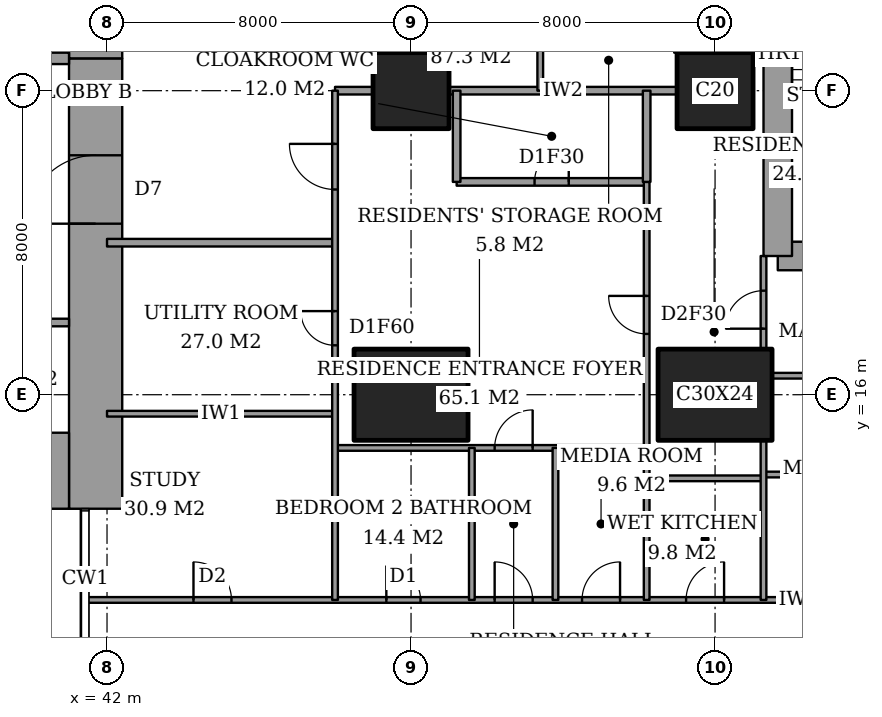
"""IFC4 building model, lengths in metres.
Left out: names, types, materials, properties, quantities, classifications, styles, units other than length and angle.
Written with IfcOpenShell. Run it as: python <this file> out.ifc"""

import sys

from ifc_helpers import new_model, si_unit, direction, frame, frame_2d, origin, origin_2d, place, context, subcontext, project, spatial, rectangle, extrude, element, fill, save


model = new_model("IFC4")
c1 = context("Model", 3, precision=1e-05, world=origin(), true_north=direction((0.0, 1.0)))
c2 = subcontext(c1, "Body", "Model", "MODEL_VIEW")
j1 = project(units=[si_unit("LENGTHUNIT", "METRE"), si_unit("PLANEANGLEUNIT", "RADIAN")], contexts=[c1])
p1 = place(None, origin())
s1 = spatial("IfcSite", under=j1, at=p1, CompositionType="ELEMENT")
p2 = place(p1, origin())
s2 = spatial("IfcBuilding", under=s1, at=p2, CompositionType="ELEMENT")
p3 = place(p2, frame((0.0, 0.0, 103.4)))
s3 = spatial("IfcBuildingStorey", under=s2, at=p3, CompositionType="ELEMENT", Elevation=103.4)
p4 = place(p3, frame((50.0, 16.0, 0.0), z_axis=(0.0, 0.0, 1.0), x_axis=(1.0, 0.0, 0.0)))
e1 = element("IfcColumn", 1, at=p4, inside=s3, PredefinedType="COLUMN", context=c2, shape_type="SweptSolid", body=[
    extrude(rectangle(XDim=3.0, YDim=2.4, at=origin_2d()), origin(), (0.0, 0.0, 1.0), 3.6),
])
p5 = place(p3, frame((50.0, 24.0, 0.0), z_axis=(0.0, 0.0, 1.0), x_axis=(1.0, 0.0, 0.0)))
e2 = element("IfcColumn", 2, at=p5, inside=s3, PredefinedType="COLUMN", context=c2, shape_type="SweptSolid", body=[
    extrude(rectangle(XDim=2.0, YDim=2.0, at=origin_2d()), origin(), (0.0, 0.0, 1.0), 3.6),
])
p6 = place(p3, frame((58.0, 16.0, 0.0), z_axis=(0.0, 0.0, 1.0), x_axis=(1.0, 0.0, 0.0)))
e3 = element("IfcColumn", 3, at=p6, inside=s3, PredefinedType="COLUMN", context=c2, shape_type="SweptSolid", body=[
    extrude(rectangle(XDim=3.0, YDim=2.4, at=origin_2d()), origin(), (0.0, 0.0, 1.0), 3.6),
])
p7 = place(p3, frame((58.0, 24.0, 0.0), z_axis=(0.0, 0.0, 1.0), x_axis=(1.0, 0.0, 0.0)))
e4 = element("IfcColumn", 4, at=p7, inside=s3, PredefinedType="COLUMN", context=c2, shape_type="SweptSolid", body=[
    extrude(rectangle(XDim=2.0, YDim=2.0, at=origin_2d()), origin(), (0.0, 0.0, 1.0), 3.6),
])
p8 = place(p3, frame((37.85, 14.0, 0.0), z_axis=(0.0, 0.0, 1.0), x_axis=(1.0, 0.0, 0.0)))
e5 = element("IfcWall", 5, at=p8, inside=s3, PredefinedType="SHEAR", context=c2, shape_type="SweptSolid", body=[
    extrude(rectangle(XDim=3.15, YDim=2.0, at=frame_2d((1.575, 0.0))), origin(), (0.0, 0.0, 1.0), 3.6),
])
p9 = place(p3, frame((41.7, 13.0, 0.0), z_axis=(0.0, 0.0, 1.0), x_axis=(0.0, 1.0, 0.0)))
e6 = element("IfcWall", 6, at=p9, inside=s3, PredefinedType="SHEAR", context=c2, shape_type="SweptSolid", body=[
    extrude(rectangle(XDim=11.85, YDim=1.4, at=frame_2d((5.925, 0.0))), origin(), (0.0, 0.0, 1.0), 3.6),
])
p10 = place(p9, frame((7.5, 0.0, 0.0)))
e7 = element("IfcOpeningElement", 7, at=p10, cuts=e6, PredefinedType="OPENING", context=c2, shape_type="SweptSolid", body=[
    extrude(rectangle(XDim=1.8, YDim=2.4, at=frame_2d((0.9, 1.2))), frame((0.0, 0.71, 0.0), z_axis=(0.0, -1.0, 0.0), x_axis=(1.0, 0.0, 0.0)), (0.0, 0.0, 1.0), 1.42),
])
p11 = place(p3, frame((41.7, 24.85, 0.0), z_axis=(0.0, 0.0, 1.0), x_axis=(0.0, 1.0, 0.0)))
e8 = element("IfcWall", 8, at=p11, inside=s3, PredefinedType="SHEAR", context=c2, shape_type="SweptSolid", body=[
    extrude(rectangle(XDim=10.15, YDim=1.4, at=frame_2d((5.075, 0.0))), origin(), (0.0, 0.0, 1.0), 3.6),
])
p12 = place(p3, frame((37.85, 24.85, 0.0), z_axis=(0.0, 0.0, 1.0), x_axis=(1.0, 0.0, 0.0)))
e9 = element("IfcWall", 9, at=p12, inside=s3, PredefinedType="SHEAR", context=c2, shape_type="SweptSolid", body=[
    extrude(rectangle(XDim=3.15, YDim=0.3, at=frame_2d((1.575, 0.0))), origin(), (0.0, 0.0, 1.0), 3.6),
])
p13 = place(p12, frame((0.95, 0.0, 0.0)))
e10 = element("IfcOpeningElement", 10, at=p13, cuts=e9, PredefinedType="OPENING", context=c2, shape_type="SweptSolid", body=[
    extrude(rectangle(XDim=1.0, YDim=2.1, at=frame_2d((0.5, 1.05))), frame((0.0, 0.16, 0.0), z_axis=(0.0, -1.0, 0.0), x_axis=(1.0, 0.0, 0.0)), (0.0, 0.0, 1.0), 0.32),
])
p14 = place(p3, frame((59.65, 19.65, 0.0), z_axis=(0.0, 0.0, 1.0), x_axis=(1.0, 0.0, 0.0)))
e11 = element("IfcWall", 11, at=p14, inside=s3, PredefinedType="SHEAR", context=c2, shape_type="SweptSolid", body=[
    extrude(rectangle(XDim=4.45, YDim=0.75, at=frame_2d((2.225, 0.0))), origin(), (0.0, 0.0, 1.0), 3.6),
])
p15 = place(p3, frame((59.65, 28.35, 0.0), z_axis=(0.0, 0.0, 1.0), x_axis=(0.0, -1.0, 0.0)))
e12 = element("IfcWall", 12, at=p15, inside=s3, PredefinedType="SHEAR", context=c2, shape_type="SweptSolid", body=[
    extrude(rectangle(XDim=8.7, YDim=0.75, at=frame_2d((4.35, 0.0))), origin(), (0.0, 0.0, 1.0), 3.6),
])
p16 = place(p15, frame((0.975, 0.0, 0.0)))
e13 = element("IfcOpeningElement", 13, at=p16, cuts=e12, PredefinedType="OPENING", context=c2, shape_type="SweptSolid", body=[
    extrude(rectangle(XDim=1.0, YDim=2.1, at=frame_2d((0.5, 1.05))), frame((0.0, 0.385, 0.0), z_axis=(0.0, -1.0, 0.0), x_axis=(1.0, 0.0, 0.0)), (0.0, 0.0, 1.0), 0.77),
])
p17 = place(p3, frame((41.439, 10.6, 0.0), z_axis=(0.0, 0.0, 1.0), x_axis=(1.0, 0.0, 0.0)))
e14 = element("IfcWall", 14, at=p17, inside=s3, PredefinedType="PARTITIONING", context=c2, shape_type="SweptSolid", body=[
    extrude(rectangle(XDim=25.011, YDim=0.15, at=frame_2d((12.505, 0.0))), origin(), (0.0, 0.0, 1.0), 3.35),
])
p18 = place(p17, frame((10.761, 0.0, 0.0)))
e15 = element("IfcOpeningElement", 15, at=p18, cuts=e14, PredefinedType="OPENING", context=c2, shape_type="SweptSolid", body=[
    extrude(rectangle(XDim=1.0, YDim=2.1, at=frame_2d((0.5, 1.05))), frame((0.0, 0.085, 0.0), z_axis=(0.0, -1.0, 0.0), x_axis=(1.0, 0.0, 0.0)), (0.0, 0.0, 1.0), 0.17),
])
p19 = place(p17, frame((20.924, 0.0, 0.0)))
e16 = element("IfcOpeningElement", 16, at=p19, cuts=e14, PredefinedType="OPENING", context=c2, shape_type="SweptSolid", body=[
    extrude(rectangle(XDim=1.0, YDim=2.1, at=frame_2d((0.5, 1.05))), frame((0.0, 0.085, 0.0), z_axis=(0.0, -1.0, 0.0), x_axis=(1.0, 0.0, 0.0)), (0.0, 0.0, 1.0), 0.17),
])
p20 = place(p17, frame((15.799, 0.0, 0.0)))
e17 = element("IfcOpeningElement", 17, at=p20, cuts=e14, PredefinedType="OPENING", context=c2, shape_type="SweptSolid", body=[
    extrude(rectangle(XDim=1.0, YDim=2.1, at=frame_2d((0.5, 1.05))), frame((0.0, 0.085, 0.0), z_axis=(0.0, -1.0, 0.0), x_axis=(1.0, 0.0, 0.0)), (0.0, 0.0, 1.0), 0.17),
])
p21 = place(p17, frame((13.061, 0.0, 0.0)))
e18 = element("IfcOpeningElement", 18, at=p21, cuts=e14, PredefinedType="OPENING", context=c2, shape_type="SweptSolid", body=[
    extrude(rectangle(XDim=1.0, YDim=2.1, at=frame_2d((0.5, 1.05))), frame((0.0, 0.085, 0.0), z_axis=(0.0, -1.0, 0.0), x_axis=(1.0, 0.0, 0.0)), (0.0, 0.0, 1.0), 0.17),
])
p22 = place(p17, frame((7.911, 0.0, 0.0)))
e19 = element("IfcOpeningElement", 19, at=p22, cuts=e14, PredefinedType="OPENING", context=c2, shape_type="SweptSolid", body=[
    extrude(rectangle(XDim=0.9, YDim=2.1, at=frame_2d((0.45, 1.05))), frame((0.0, 0.085, 0.0), z_axis=(0.0, -1.0, 0.0), x_axis=(1.0, 0.0, 0.0)), (0.0, 0.0, 1.0), 0.17),
])
p23 = place(p17, frame((2.836, 0.0, 0.0)))
e20 = element("IfcOpeningElement", 20, at=p23, cuts=e14, PredefinedType="OPENING", context=c2, shape_type="SweptSolid", body=[
    extrude(rectangle(XDim=1.0, YDim=2.1, at=frame_2d((0.5, 1.05))), frame((0.0, 0.085, 0.0), z_axis=(0.0, -1.0, 0.0), x_axis=(1.0, 0.0, 0.0)), (0.0, 0.0, 1.0), 0.17),
])
p24 = place(p3, frame((56.2, 13.8, 0.0), z_axis=(0.0, 0.0, 1.0), x_axis=(1.0, 0.0, 0.0)))
e21 = element("IfcWall", 21, at=p24, inside=s3, PredefinedType="PARTITIONING", context=c2, shape_type="SweptSolid", body=[
    extrude(rectangle(XDim=3.075, YDim=0.15, at=frame_2d((1.538, 0.0))), origin(), (0.0, 0.0, 1.0), 3.35),
])
p25 = place(p3, frame((59.275, 13.9, 0.0), z_axis=(0.0, 0.0, 1.0), x_axis=(1.0, 0.0, 0.0)))
e22 = element("IfcWall", 22, at=p25, inside=s3, PredefinedType="PARTITIONING", context=c2, shape_type="SweptSolid", body=[
    extrude(rectangle(XDim=2.4, YDim=0.15, at=frame_2d((1.2, 0.0))), origin(), (0.0, 0.0, 1.0), 3.35),
])
p26 = place(p3, frame((48.0, 14.6, 0.0), z_axis=(0.0, 0.0, 1.0), x_axis=(1.0, 0.0, 0.0)))
e23 = element("IfcWall", 23, at=p26, inside=s3, PredefinedType="PARTITIONING", context=c2, shape_type="SweptSolid", body=[
    extrude(rectangle(XDim=8.2, YDim=0.15, at=frame_2d((4.1, 0.0))), origin(), (0.0, 0.0, 1.0), 3.35),
])
p27 = place(p26, frame((4.2, 0.0, 0.0)))
e24 = element("IfcOpeningElement", 24, at=p27, cuts=e23, PredefinedType="OPENING", context=c2, shape_type="SweptSolid", body=[
    extrude(rectangle(XDim=1.0, YDim=2.1, at=frame_2d((0.5, 1.05))), frame((0.0, 0.085, 0.0), z_axis=(0.0, -1.0, 0.0), x_axis=(1.0, 0.0, 0.0)), (0.0, 0.0, 1.0), 0.17),
])
p28 = place(p3, frame((42.0, 15.5, 0.0), z_axis=(0.0, 0.0, 1.0), x_axis=(1.0, 0.0, 0.0)))
e25 = element("IfcWall", 25, at=p28, inside=s3, PredefinedType="PARTITIONING", context=c2, shape_type="SweptSolid", body=[
    extrude(rectangle(XDim=6.0, YDim=0.15, at=frame_2d((3.0, 0.0))), origin(), (0.0, 0.0, 1.0), 3.35),
])
p29 = place(p3, frame((59.5, 16.5, 0.0), z_axis=(0.0, 0.0, 1.0), x_axis=(1.0, 0.0, 0.0)))
e26 = element("IfcWall", 26, at=p29, inside=s3, PredefinedType="PARTITIONING", context=c2, shape_type="SweptSolid", body=[
    extrude(rectangle(XDim=5.15, YDim=0.15, at=frame_2d((2.575, 0.0))), origin(), (0.0, 0.0, 1.0), 3.35),
])
p30 = place(p3, frame((42.0, 20.0, 0.0), z_axis=(0.0, 0.0, 1.0), x_axis=(1.0, 0.0, 0.0)))
e27 = element("IfcWall", 27, at=p30, inside=s3, PredefinedType="PARTITIONING", context=c2, shape_type="SweptSolid", body=[
    extrude(rectangle(XDim=6.0, YDim=0.2, at=frame_2d((3.0, 0.0))), origin(), (0.0, 0.0, 1.0), 3.35),
])
p31 = place(p3, frame((51.2, 21.6, 0.0), z_axis=(0.0, 0.0, 1.0), x_axis=(1.0, 0.0, 0.0)))
e28 = element("IfcWall", 28, at=p31, inside=s3, PredefinedType="PARTITIONING", context=c2, shape_type="SweptSolid", body=[
    extrude(rectangle(XDim=5.0, YDim=0.2, at=frame_2d((2.5, 0.0))), origin(), (0.0, 0.0, 1.0), 3.35),
])
p32 = place(p31, frame((2.05, 0.0, 0.0)))
e29 = element("IfcOpeningElement", 29, at=p32, cuts=e28, PredefinedType="OPENING", context=c2, shape_type="SweptSolid", body=[
    extrude(rectangle(XDim=0.9, YDim=2.1, at=frame_2d((0.45, 1.05))), frame((0.0, 0.11, 0.0), z_axis=(0.0, -1.0, 0.0), x_axis=(1.0, 0.0, 0.0)), (0.0, 0.0, 1.0), 0.22),
])
p33 = place(p3, frame((48.0, 24.0, 0.0), z_axis=(0.0, 0.0, 1.0), x_axis=(1.0, 0.0, 0.0)))
e30 = element("IfcWall", 30, at=p33, inside=s3, PredefinedType="PARTITIONING", context=c2, shape_type="SweptSolid", body=[
    extrude(rectangle(XDim=1.0, YDim=0.2, at=frame_2d((0.5, 0.0))), origin(), (0.0, 0.0, 1.0), 3.35),
])
p34 = place(p3, frame((51.0, 24.0, 0.0), z_axis=(0.0, 0.0, 1.0), x_axis=(1.0, 0.0, 0.0)))
e31 = element("IfcWall", 31, at=p34, inside=s3, PredefinedType="PARTITIONING", context=c2, shape_type="SweptSolid", body=[
    extrude(rectangle(XDim=6.0, YDim=0.2, at=frame_2d((3.0, 0.0))), origin(), (0.0, 0.0, 1.0), 3.35),
])
p35 = place(p3, frame((48.0, 10.6, 0.0), z_axis=(0.0, 0.0, 1.0), x_axis=(0.0, 1.0, 0.0)))
e32 = element("IfcWall", 32, at=p35, inside=s3, PredefinedType="PARTITIONING", context=c2, shape_type="SweptSolid", body=[
    extrude(rectangle(XDim=13.4, YDim=0.15, at=frame_2d((6.7, 0.0))), origin(), (0.0, 0.0, 1.0), 3.35),
])
p36 = place(p35, frame((10.8, 0.0, 0.0)))
e33 = element("IfcOpeningElement", 33, at=p36, cuts=e32, PredefinedType="OPENING", context=c2, shape_type="SweptSolid", body=[
    extrude(rectangle(XDim=1.2, YDim=2.4, at=frame_2d((0.6, 1.2))), frame((0.0, 0.085, 0.0), z_axis=(0.0, -1.0, 0.0), x_axis=(1.0, 0.0, 0.0)), (0.0, 0.0, 1.0), 0.17),
])
p37 = place(p35, frame((6.7, 0.0, 0.0)))
e34 = element("IfcOpeningElement", 34, at=p37, cuts=e32, PredefinedType="OPENING", context=c2, shape_type="SweptSolid", body=[
    extrude(rectangle(XDim=0.9, YDim=2.1, at=frame_2d((0.45, 1.05))), frame((0.0, 0.085, 0.0), z_axis=(0.0, -1.0, 0.0), x_axis=(1.0, 0.0, 0.0)), (0.0, 0.0, 1.0), 0.17),
])
p38 = place(p3, frame((51.2, 21.6, 0.0), z_axis=(0.0, 0.0, 1.0), x_axis=(0.0, 1.0, 0.0)))
e35 = element("IfcWall", 35, at=p38, inside=s3, PredefinedType="PARTITIONING", context=c2, shape_type="SweptSolid", body=[
    extrude(rectangle(XDim=2.4, YDim=0.2, at=frame_2d((1.2, 0.0))), origin(), (0.0, 0.0, 1.0), 3.35),
])
p39 = place(p3, frame((51.6, 10.6, 0.0), z_axis=(0.0, 0.0, 1.0), x_axis=(0.0, 1.0, 0.0)))
e36 = element("IfcWall", 36, at=p39, inside=s3, PredefinedType="PARTITIONING", context=c2, shape_type="SweptSolid", body=[
    extrude(rectangle(XDim=4.0, YDim=0.15, at=frame_2d((2.0, 0.0))), origin(), (0.0, 0.0, 1.0), 3.35),
])
p40 = place(p3, frame((53.4, 24.0, 0.0), z_axis=(0.0, 0.0, 1.0), x_axis=(0.0, 1.0, 0.0)))
e37 = element("IfcWall", 37, at=p40, inside=s3, PredefinedType="PARTITIONING", context=c2, shape_type="SweptSolid", body=[
    extrude(rectangle(XDim=1.6, YDim=0.15, at=frame_2d((0.8, 0.0))), origin(), (0.0, 0.0, 1.0), 3.35),
])
p41 = place(p3, frame((53.8, 10.6, 0.0), z_axis=(0.0, 0.0, 1.0), x_axis=(0.0, 1.0, 0.0)))
e38 = element("IfcWall", 38, at=p41, inside=s3, PredefinedType="PARTITIONING", context=c2, shape_type="SweptSolid", body=[
    extrude(rectangle(XDim=4.0, YDim=0.15, at=frame_2d((2.0, 0.0))), origin(), (0.0, 0.0, 1.0), 3.35),
])
p42 = place(p3, frame((56.2, 21.6, 0.0), z_axis=(0.0, 0.0, 1.0), x_axis=(0.0, 1.0, 0.0)))
e39 = element("IfcWall", 39, at=p42, inside=s3, PredefinedType="PARTITIONING", context=c2, shape_type="SweptSolid", body=[
    extrude(rectangle(XDim=2.4, YDim=0.2, at=frame_2d((1.2, 0.0))), origin(), (0.0, 0.0, 1.0), 3.35),
])
p43 = place(p3, frame((56.2, 10.6, 0.0), z_axis=(0.0, 0.0, 1.0), x_axis=(0.0, 1.0, 0.0)))
e40 = element("IfcWall", 40, at=p43, inside=s3, PredefinedType="PARTITIONING", context=c2, shape_type="SweptSolid", body=[
    extrude(rectangle(XDim=11.0, YDim=0.15, at=frame_2d((5.5, 0.0))), origin(), (0.0, 0.0, 1.0), 3.35),
])
p44 = place(p43, frame((7.0, 0.0, 0.0)))
e41 = element("IfcOpeningElement", 41, at=p44, cuts=e40, PredefinedType="OPENING", context=c2, shape_type="SweptSolid", body=[
    extrude(rectangle(XDim=1.0, YDim=2.1, at=frame_2d((0.5, 1.05))), frame((0.0, 0.085, 0.0), z_axis=(0.0, -1.0, 0.0), x_axis=(1.0, 0.0, 0.0)), (0.0, 0.0, 1.0), 0.17),
])
p45 = place(p3, frame((59.275, 10.6, 0.0), z_axis=(0.0, 0.0, 1.0), x_axis=(0.0, 1.0, 0.0)))
e42 = element("IfcWall", 42, at=p45, inside=s3, PredefinedType="PARTITIONING", context=c2, shape_type="SweptSolid", body=[
    extrude(rectangle(XDim=4.2, YDim=0.15, at=frame_2d((2.1, 0.0))), origin(), (0.0, 0.0, 1.0), 3.35),
])
p46 = place(p3, frame((59.275, 17.2, 0.0), z_axis=(0.0, 0.0, 1.0), x_axis=(0.0, 1.0, 0.0)))
e43 = element("IfcWall", 43, at=p46, inside=s3, PredefinedType="PARTITIONING", context=c2, shape_type="SweptSolid", body=[
    extrude(rectangle(XDim=2.45, YDim=0.15, at=frame_2d((1.225, 0.0))), origin(), (0.0, 0.0, 1.0), 3.35),
])
p47 = place(p46, frame((0.538, 0.0, 0.0)))
e44 = element("IfcOpeningElement", 44, at=p47, cuts=e43, PredefinedType="OPENING", context=c2, shape_type="SweptSolid", body=[
    extrude(rectangle(XDim=1.0, YDim=2.1, at=frame_2d((0.5, 1.05))), frame((0.0, 0.085, 0.0), z_axis=(0.0, -1.0, 0.0), x_axis=(1.0, 0.0, 0.0)), (0.0, 0.0, 1.0), 0.17),
])
p48 = place(p3, frame((28.3, 17.9, 0.0), z_axis=(0.0, 0.0, 1.0), x_axis=(1.0, 0.0, 0.0)))
e45 = element("IfcWall", 45, at=p48, inside=s3, PredefinedType="PARTITIONING", context=c2, shape_type="SweptSolid", body=[
    extrude(rectangle(XDim=12.7, YDim=0.2, at=frame_2d((6.35, 0.0))), origin(), (0.0, 0.0, 1.0), 3.6),
])
p49 = place(p48, frame((0.95, 0.0, 0.0)))
e46 = element("IfcOpeningElement", 46, at=p49, cuts=e45, PredefinedType="OPENING", context=c2, shape_type="SweptSolid", body=[
    extrude(rectangle(XDim=1.1, YDim=2.1, at=frame_2d((0.55, 1.05))), frame((0.0, 0.11, 0.0), z_axis=(0.0, -1.0, 0.0), x_axis=(1.0, 0.0, 0.0)), (0.0, 0.0, 1.0), 0.22),
])
p50 = place(p48, frame((4.15, 0.0, 0.0)))
e47 = element("IfcOpeningElement", 47, at=p50, cuts=e45, PredefinedType="OPENING", context=c2, shape_type="SweptSolid", body=[
    extrude(rectangle(XDim=1.1, YDim=2.1, at=frame_2d((0.55, 1.05))), frame((0.0, 0.11, 0.0), z_axis=(0.0, -1.0, 0.0), x_axis=(1.0, 0.0, 0.0)), (0.0, 0.0, 1.0), 0.22),
])
p51 = place(p48, frame((7.35, 0.0, 0.0)))
e48 = element("IfcOpeningElement", 48, at=p51, cuts=e45, PredefinedType="OPENING", context=c2, shape_type="SweptSolid", body=[
    extrude(rectangle(XDim=1.1, YDim=2.1, at=frame_2d((0.55, 1.05))), frame((0.0, 0.11, 0.0), z_axis=(0.0, -1.0, 0.0), x_axis=(1.0, 0.0, 0.0)), (0.0, 0.0, 1.0), 0.22),
])
p52 = place(p48, frame((10.6, 0.0, 0.0)))
e49 = element("IfcOpeningElement", 49, at=p52, cuts=e45, PredefinedType="OPENING", context=c2, shape_type="SweptSolid", body=[
    extrude(rectangle(XDim=1.2, YDim=2.1, at=frame_2d((0.6, 1.05))), frame((0.0, 0.11, 0.0), z_axis=(0.0, -1.0, 0.0), x_axis=(1.0, 0.0, 0.0)), (0.0, 0.0, 1.0), 0.22),
])
p53 = place(p18, origin())
e50 = element("IfcDoor", 50, at=p53, inside=s3, OperationType="SINGLE_SWING_RIGHT", PredefinedType="DOOR", context=c2, shape_type="SweptSolid", body=[
    extrude(rectangle(XDim=1.0, YDim=2.1, at=frame_2d((0.5, 1.05))), frame((0.0, 0.025, 0.0), z_axis=(0.0, -1.0, 0.0), x_axis=(1.0, 0.0, 0.0)), (0.0, 0.0, 1.0), 0.05),
])
fill(e15, e50)
p54 = place(p47, origin())
e51 = element("IfcDoor", 51, at=p54, inside=s3, OperationType="SINGLE_SWING_RIGHT", PredefinedType="DOOR", context=c2, shape_type="SweptSolid", body=[
    extrude(rectangle(XDim=1.0, YDim=2.1, at=frame_2d((0.5, 1.05))), frame((0.0, 0.025, 0.0), z_axis=(0.0, -1.0, 0.0), x_axis=(1.0, 0.0, 0.0)), (0.0, 0.0, 1.0), 0.05),
])
fill(e44, e51)
p55 = place(p20, origin())
e52 = element("IfcDoor", 52, at=p55, inside=s3, OperationType="SINGLE_SWING_LEFT", PredefinedType="DOOR", context=c2, shape_type="SweptSolid", body=[
    extrude(rectangle(XDim=1.0, YDim=2.1, at=frame_2d((0.5, 1.05))), frame((0.0, 0.025, 0.0), z_axis=(0.0, -1.0, 0.0), x_axis=(1.0, 0.0, 0.0)), (0.0, 0.0, 1.0), 0.05),
])
fill(e17, e52)
p56 = place(p44, origin())
e53 = element("IfcDoor", 53, at=p56, inside=s3, OperationType="SINGLE_SWING_LEFT", PredefinedType="DOOR", context=c2, shape_type="SweptSolid", body=[
    extrude(rectangle(XDim=1.0, YDim=2.1, at=frame_2d((0.5, 1.05))), frame((0.0, 0.025, 0.0), z_axis=(0.0, -1.0, 0.0), x_axis=(1.0, 0.0, 0.0)), (0.0, 0.0, 1.0), 0.05),
])
fill(e41, e53)
p57 = place(p32, origin())
e54 = element("IfcDoor", 54, at=p57, inside=s3, OperationType="SINGLE_SWING_LEFT", PredefinedType="DOOR", context=c2, shape_type="SweptSolid", body=[
    extrude(rectangle(XDim=0.9, YDim=2.1, at=frame_2d((0.45, 1.05))), frame((0.0, 0.025, 0.0), z_axis=(0.0, -1.0, 0.0), x_axis=(1.0, 0.0, 0.0)), (0.0, 0.0, 1.0), 0.05),
])
fill(e29, e54)
p58 = place(p36, origin())
e55 = element("IfcDoor", 55, at=p58, inside=s3, OperationType="SINGLE_SWING_LEFT", PredefinedType="DOOR", context=c2, shape_type="SweptSolid", body=[
    extrude(rectangle(XDim=1.2, YDim=2.4, at=frame_2d((0.6, 1.2))), frame((0.0, 0.025, 0.0), z_axis=(0.0, -1.0, 0.0), x_axis=(1.0, 0.0, 0.0)), (0.0, 0.0, 1.0), 0.05),
])
fill(e33, e55)
p59 = place(p21, origin())
e56 = element("IfcDoor", 56, at=p59, inside=s3, OperationType="SINGLE_SWING_LEFT", PredefinedType="DOOR", context=c2, shape_type="SweptSolid", body=[
    extrude(rectangle(XDim=1.0, YDim=2.1, at=frame_2d((0.5, 1.05))), frame((0.0, 0.025, 0.0), z_axis=(0.0, -1.0, 0.0), x_axis=(1.0, 0.0, 0.0)), (0.0, 0.0, 1.0), 0.05),
])
fill(e18, e56)
p60 = place(p27, origin())
e57 = element("IfcDoor", 57, at=p60, inside=s3, OperationType="SINGLE_SWING_LEFT", PredefinedType="DOOR", context=c2, shape_type="SweptSolid", body=[
    extrude(rectangle(XDim=1.0, YDim=2.1, at=frame_2d((0.5, 1.05))), frame((0.0, 0.025, 0.0), z_axis=(0.0, -1.0, 0.0), x_axis=(1.0, 0.0, 0.0)), (0.0, 0.0, 1.0), 0.05),
])
fill(e24, e57)
p61 = place(p22, origin())
e58 = element("IfcDoor", 58, at=p61, inside=s3, OperationType="SINGLE_SWING_RIGHT", PredefinedType="DOOR", context=c2, shape_type="SweptSolid", body=[
    extrude(rectangle(XDim=0.9, YDim=2.1, at=frame_2d((0.45, 1.05))), frame((0.0, 0.025, 0.0), z_axis=(0.0, -1.0, 0.0), x_axis=(1.0, 0.0, 0.0)), (0.0, 0.0, 1.0), 0.05),
])
fill(e19, e58)
p62 = place(p23, origin())
e59 = element("IfcDoor", 59, at=p62, inside=s3, OperationType="SINGLE_SWING_RIGHT", PredefinedType="DOOR", context=c2, shape_type="SweptSolid", body=[
    extrude(rectangle(XDim=1.0, YDim=2.1, at=frame_2d((0.5, 1.05))), frame((0.0, 0.025, 0.0), z_axis=(0.0, -1.0, 0.0), x_axis=(1.0, 0.0, 0.0)), (0.0, 0.0, 1.0), 0.05),
])
fill(e20, e59)
p63 = place(p37, origin())
e60 = element("IfcDoor", 60, at=p63, inside=s3, OperationType="SINGLE_SWING_LEFT", PredefinedType="DOOR", context=c2, shape_type="SweptSolid", body=[
    extrude(rectangle(XDim=0.9, YDim=2.1, at=frame_2d((0.45, 1.05))), frame((0.0, 0.025, 0.0), z_axis=(0.0, -1.0, 0.0), x_axis=(1.0, 0.0, 0.0)), (0.0, 0.0, 1.0), 0.05),
])
fill(e34, e60)
p64 = place(p10, origin())
e61 = element("IfcDoor", 61, at=p64, inside=s3, OperationType="DOUBLE_DOOR_DOUBLE_SWING", PredefinedType="DOOR", context=c2, shape_type="SweptSolid", body=[
    extrude(rectangle(XDim=1.8, YDim=2.4, at=frame_2d((0.9, 1.2))), frame((0.0, 0.025, 0.0), z_axis=(0.0, -1.0, 0.0), x_axis=(1.0, 0.0, 0.0)), (0.0, 0.0, 1.0), 0.05),
])
fill(e7, e61)
save(model, sys.argv[1])
